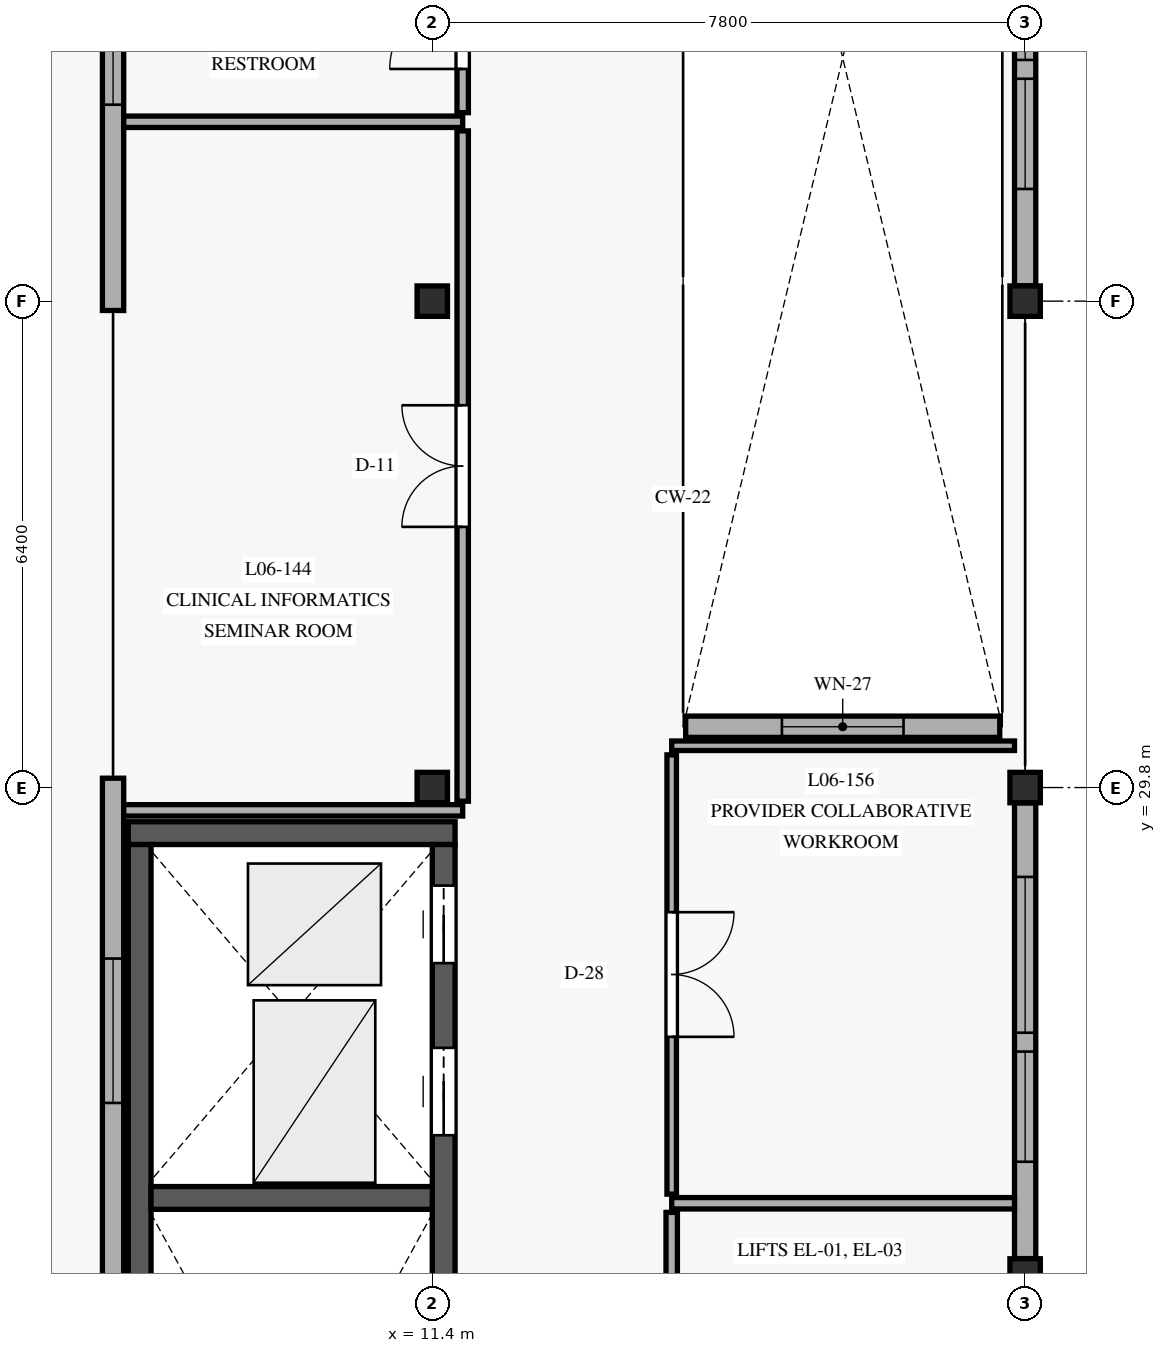
"""IFC4 building model, lengths in metres.
Left out: names, types, materials, properties, quantities, classifications, styles, units other than length and angle.
Written with IfcOpenShell. Run it as: python <this file> out.ifc"""

import sys

from ifc_helpers import new_model, si_unit, direction, frame, frame_2d, origin, origin_with_axes, origin_2d, place, context, subcontext, project, spatial, rectangle, extrude, element, fill, save


model = new_model("IFC4")
c1 = context("Model", 3, precision=1e-05, world=origin(), true_north=direction((0.0, 1.0)))
c2 = subcontext(c1, "Body", "Model", "MODEL_VIEW")
j1 = project(units=[si_unit("LENGTHUNIT", "METRE"), si_unit("PLANEANGLEUNIT", "RADIAN")], contexts=[c1])
p1 = place(None, origin())
s1 = spatial("IfcSite", under=j1, at=p1, CompositionType="ELEMENT")
p2 = place(p1, origin())
s2 = spatial("IfcBuilding", under=s1, at=p2, CompositionType="ELEMENT")
p3 = place(p2, frame((0.0, 0.0, 21.6)))
s3 = spatial("IfcBuildingStorey", under=s2, at=p3, CompositionType="ELEMENT", Elevation=21.6)
for number, where, z_axis, x_axis in (
    (1, (11.4, 29.8, 0.0), (0.0, 0.0, 1.0), (1.0, 0.0, 0.0)),
    (2, (11.4, 36.2, 0.0), (0.0, 0.0, 1.0), (1.0, 0.0, 0.0)),
    (3, (19.2, 23.4, 0.0), (0.0, 0.0, 1.0), (1.0, 0.0, 0.0)),
    (4, (19.2, 29.8, 0.0), (0.0, 0.0, 1.0), (1.0, 0.0, 0.0)),
    (5, (19.2, 36.2, 0.0), (0.0, 0.0, 1.0), (1.0, 0.0, 0.0)),
):
    element("IfcColumn", number, at=place(p3, frame(where, z_axis=z_axis, x_axis=x_axis)), inside=s3, PredefinedType="COLUMN", context=c2, shape_type="SweptSolid", body=[
        extrude(rectangle(XDim=0.4, YDim=0.4, at=origin_2d()), origin(), (0.0, 0.0, 1.0), 4.05),
    ])
p4 = place(p3, frame((11.7, 29.2, 0.0), z_axis=(0.0, 0.0, 1.0), x_axis=(-1.0, 0.0, 0.0)))
e6 = element("IfcWall", 6, at=p4, inside=s3, PredefinedType="SHEAR", context=c2, shape_type="SweptSolid", body=[
    extrude(rectangle(XDim=4.3, YDim=0.3, at=frame_2d((2.15, 0.0))), origin(), (0.0, 0.0, 1.0), 3.84),
])
p5 = place(p3, frame((7.55, 29.05, 0.0), z_axis=(0.0, 0.0, 1.0), x_axis=(0.0, -1.0, 0.0)))
e7 = element("IfcWall", 7, at=p5, inside=s3, PredefinedType="SHEAR", context=c2, shape_type="SweptSolid", body=[
    extrude(rectangle(XDim=11.7, YDim=0.3, at=frame_2d((5.85, 0.0))), origin(), (0.0, 0.0, 1.0), 3.84),
])
p6 = place(p3, frame((11.55, 17.35, 0.0), z_axis=(0.0, 0.0, 1.0), x_axis=(0.0, 1.0, 0.0)))
e8 = element("IfcWall", 8, at=p6, inside=s3, PredefinedType="SHEAR", context=c2, shape_type="SweptSolid", body=[
    extrude(rectangle(XDim=11.7, YDim=0.3, at=frame_2d((5.85, 0.0))), origin(), (0.0, 0.0, 1.0), 3.84),
])
p7 = place(p6, frame((0.2, 0.0, 0.0)))
e9 = element("IfcOpeningElement", 9, at=p7, cuts=e8, PredefinedType="OPENING", context=c2, shape_type="SweptSolid", body=[
    extrude(rectangle(XDim=1.1, YDim=2.2, at=frame_2d((0.55, 1.1))), frame((0.0, 0.16, 0.0), z_axis=(0.0, -1.0, 0.0), x_axis=(1.0, 0.0, 0.0)), (0.0, 0.0, 1.0), 0.32),
])
p8 = place(p6, frame((7.875, 0.0, 0.0)))
e10 = element("IfcOpeningElement", 10, at=p8, cuts=e8, PredefinedType="OPENING", context=c2, shape_type="SweptSolid", body=[
    extrude(rectangle(XDim=1.15, YDim=2.2, at=frame_2d((0.575, 1.1))), frame((0.0, 0.16, 0.0), z_axis=(0.0, -1.0, 0.0), x_axis=(1.0, 0.0, 0.0)), (0.0, 0.0, 1.0), 0.32),
])
p9 = place(p6, frame((10.14, 0.0, 0.0)))
e11 = element("IfcOpeningElement", 11, at=p9, cuts=e8, PredefinedType="OPENING", context=c2, shape_type="SweptSolid", body=[
    extrude(rectangle(XDim=1.02, YDim=2.15, at=frame_2d((0.51, 1.075))), frame((0.0, 0.16, 0.0), z_axis=(0.0, -1.0, 0.0), x_axis=(1.0, 0.0, 0.0)), (0.0, 0.0, 1.0), 0.32),
])
p10 = place(p3, frame((7.7, 24.4, 0.0), z_axis=(0.0, 0.0, 1.0), x_axis=(1.0, 0.0, 0.0)))
e12 = element("IfcWall", 12, at=p10, inside=s3, PredefinedType="SHEAR", context=c2, shape_type="SweptSolid", body=[
    extrude(rectangle(XDim=3.7, YDim=0.3, at=frame_2d((1.85, 0.0))), origin(), (0.0, 0.0, 1.0), 3.84),
])
p11 = place(p3, frame((7.2, 29.923, 0.0), z_axis=(0.0, 0.0, 1.0), x_axis=(0.0, -1.0, 0.0)))
e13 = element("IfcWall", 13, at=p11, inside=s3, PredefinedType="SOLIDWALL", context=c2, shape_type="SweptSolid", body=[
    extrude(rectangle(XDim=6.646, YDim=0.28, at=frame_2d((3.323, 0.0))), origin(), (0.0, 0.0, 1.0), 3.84),
])
p12 = place(p11, frame((2.373, 0.0, 0.85)))
e14 = element("IfcOpeningElement", 14, at=p12, cuts=e13, PredefinedType="OPENING", context=c2, shape_type="SweptSolid", body=[
    extrude(rectangle(XDim=1.9, YDim=1.75, at=frame_2d((0.95, 0.875))), frame((0.0, 0.15, 0.0), z_axis=(0.0, -1.0, 0.0), x_axis=(1.0, 0.0, 0.0)), (0.0, 0.0, 1.0), 0.3),
])
p13 = place(p3, frame((7.2, 42.723, 0.0), z_axis=(0.0, 0.0, 1.0), x_axis=(0.0, -1.0, 0.0)))
e15 = element("IfcWall", 15, at=p13, inside=s3, PredefinedType="SOLIDWALL", context=c2, shape_type="SweptSolid", body=[
    extrude(rectangle(XDim=6.646, YDim=0.28, at=frame_2d((3.323, 0.0))), origin(), (0.0, 0.0, 1.0), 3.84),
])
p14 = place(p13, frame((2.038, 0.0, 0.85)))
e16 = element("IfcOpeningElement", 16, at=p14, cuts=e15, PredefinedType="OPENING", context=c2, shape_type="SweptSolid", body=[
    extrude(rectangle(XDim=1.9, YDim=1.75, at=frame_2d((0.95, 0.875))), frame((0.0, 0.15, 0.0), z_axis=(0.0, -1.0, 0.0), x_axis=(1.0, 0.0, 0.0)), (0.0, 0.0, 1.0), 0.3),
])
p15 = place(p3, frame((19.2, 23.602, 0.0), z_axis=(0.0, 0.0, 1.0), x_axis=(0.0, 1.0, 0.0)))
e17 = element("IfcWall", 17, at=p15, inside=s3, PredefinedType="SOLIDWALL", context=c2, shape_type="SweptSolid", body=[
    extrude(rectangle(XDim=5.996, YDim=0.28, at=frame_2d((2.998, 0.0))), origin(), (0.0, 0.0, 1.0), 3.46),
])
p16 = place(p15, frame((1.274, 0.0, 0.85)))
e18 = element("IfcOpeningElement", 18, at=p16, cuts=e17, PredefinedType="OPENING", context=c2, shape_type="SweptSolid", body=[
    extrude(rectangle(XDim=1.45, YDim=1.95, at=frame_2d((0.725, 0.975))), frame((0.0, 0.15, 0.0), z_axis=(0.0, -1.0, 0.0), x_axis=(1.0, 0.0, 0.0)), (0.0, 0.0, 1.0), 0.3),
])
p17 = place(p15, frame((2.972, 0.0, 0.85)))
e19 = element("IfcOpeningElement", 19, at=p17, cuts=e17, PredefinedType="OPENING", context=c2, shape_type="SweptSolid", body=[
    extrude(rectangle(XDim=2.05, YDim=1.95, at=frame_2d((1.025, 0.975))), frame((0.0, 0.15, 0.0), z_axis=(0.0, -1.0, 0.0), x_axis=(1.0, 0.0, 0.0)), (0.0, 0.0, 1.0), 0.3),
])
p18 = place(p3, frame((19.2, 36.402, 0.0), z_axis=(0.0, 0.0, 1.0), x_axis=(0.0, 1.0, 0.0)))
e20 = element("IfcWall", 20, at=p18, inside=s3, PredefinedType="SOLIDWALL", context=c2, shape_type="SweptSolid", body=[
    extrude(rectangle(XDim=5.996, YDim=0.28, at=frame_2d((2.998, 0.0))), origin(), (0.0, 0.0, 1.0), 3.46),
])
p19 = place(p18, frame((1.274, 0.0, 0.85)))
e21 = element("IfcOpeningElement", 21, at=p19, cuts=e20, PredefinedType="OPENING", context=c2, shape_type="SweptSolid", body=[
    extrude(rectangle(XDim=1.45, YDim=1.95, at=frame_2d((0.725, 0.975))), frame((0.0, 0.15, 0.0), z_axis=(0.0, -1.0, 0.0), x_axis=(1.0, 0.0, 0.0)), (0.0, 0.0, 1.0), 0.3),
])
p20 = place(p18, frame((2.972, 0.0, 0.85)))
e22 = element("IfcOpeningElement", 22, at=p20, cuts=e20, PredefinedType="OPENING", context=c2, shape_type="SweptSolid", body=[
    extrude(rectangle(XDim=2.05, YDim=1.95, at=frame_2d((1.025, 0.975))), frame((0.0, 0.15, 0.0), z_axis=(0.0, -1.0, 0.0), x_axis=(1.0, 0.0, 0.0)), (0.0, 0.0, 1.0), 0.3),
])
p21 = place(p3, frame((18.866, 30.6, 0.0), z_axis=(0.0, 0.0, 1.0), x_axis=(-1.0, 0.0, 0.0)))
e23 = element("IfcWall", 23, at=p21, inside=s3, PredefinedType="SOLIDWALL", context=c2, shape_type="SweptSolid", body=[
    extrude(rectangle(XDim=4.132, YDim=0.28, at=frame_2d((2.066, 0.0))), origin(), (0.0, 0.0, 1.0), 3.84),
])
p22 = place(p21, frame((1.266, 0.0, 0.85)))
e24 = element("IfcOpeningElement", 24, at=p22, cuts=e23, PredefinedType="OPENING", context=c2, shape_type="SweptSolid", body=[
    extrude(rectangle(XDim=1.6, YDim=1.8, at=frame_2d((0.8, 0.9))), frame((0.0, 0.15, 0.0), z_axis=(0.0, -1.0, 0.0), x_axis=(1.0, 0.0, 0.0)), (0.0, 0.0, 1.0), 0.3),
])
p23 = place(p3, frame((11.8, 29.62, 0.0), z_axis=(0.0, 0.0, 1.0), x_axis=(0.0, 1.0, 0.0)))
e25 = element("IfcWall", 25, at=p23, inside=s3, PredefinedType="PARTITIONING", context=c2, shape_type="SweptSolid", body=[
    extrude(rectangle(XDim=8.82, YDim=0.15, at=frame_2d((4.41, 0.0))), origin(), (0.0, 0.0, 1.0), 3.435),
])
p24 = place(p23, frame((3.61, 0.0, 0.0)))
e26 = element("IfcOpeningElement", 26, at=p24, cuts=e25, PredefinedType="OPENING", context=c2, shape_type="SweptSolid", body=[
    extrude(rectangle(XDim=1.6, YDim=2.25, at=frame_2d((0.8, 1.125))), frame((0.0, 0.085, 0.0), z_axis=(0.0, -1.0, 0.0), x_axis=(1.0, 0.0, 0.0)), (0.0, 0.0, 1.0), 0.17),
])
p25 = place(p3, frame((7.34, 38.56, 0.0), z_axis=(0.0, 0.0, 1.0), x_axis=(1.0, 0.0, 0.0)))
e27 = element("IfcWall", 27, at=p25, inside=s3, PredefinedType="PARTITIONING", context=c2, shape_type="SweptSolid", body=[
    extrude(rectangle(XDim=4.46, YDim=0.15, at=frame_2d((2.23, 0.0))), origin(), (0.0, 0.0, 1.0), 3.455),
])
p26 = place(p3, frame((7.34, 29.5, 0.0), z_axis=(0.0, 0.0, 1.0), x_axis=(1.0, 0.0, 0.0)))
e28 = element("IfcWall", 28, at=p26, inside=s3, PredefinedType="PARTITIONING", context=c2, shape_type="SweptSolid", body=[
    extrude(rectangle(XDim=4.46, YDim=0.15, at=frame_2d((2.23, 0.0))), origin(), (0.0, 0.0, 1.0), 3.435),
])
p27 = place(p3, frame((11.8, 38.68, 0.0), z_axis=(0.0, 0.0, 1.0), x_axis=(0.0, 1.0, 0.0)))
e29 = element("IfcWall", 29, at=p27, inside=s3, PredefinedType="PARTITIONING", context=c2, shape_type="SweptSolid", body=[
    extrude(rectangle(XDim=2.11, YDim=0.15, at=frame_2d((1.055, 0.0))), origin(), (0.0, 0.0, 1.0), 3.835),
])
p28 = place(p27, frame((0.575, 0.0, 0.0)))
e30 = element("IfcOpeningElement", 30, at=p28, cuts=e29, PredefinedType="OPENING", context=c2, shape_type="SweptSolid", body=[
    extrude(rectangle(XDim=0.96, YDim=2.1, at=frame_2d((0.48, 1.05))), frame((0.0, 0.085, 0.0), z_axis=(0.0, -1.0, 0.0), x_axis=(1.0, 0.0, 0.0)), (0.0, 0.0, 1.0), 0.17),
])
p29 = place(p3, frame((14.55, 16.89, 0.0), z_axis=(0.0, 0.0, 1.0), x_axis=(0.0, 1.0, 0.0)))
e31 = element("IfcWall", 31, at=p29, inside=s3, PredefinedType="PARTITIONING", context=c2, shape_type="SweptSolid", body=[
    extrude(rectangle(XDim=7.32, YDim=0.15, at=frame_2d((3.66, 0.0))), origin(), (0.0, 0.0, 1.0), 3.435),
])
p30 = place(p29, frame((3.134, 0.0, 0.0)))
e32 = element("IfcOpeningElement", 32, at=p30, cuts=e31, PredefinedType="OPENING", context=c2, shape_type="SweptSolid", body=[
    extrude(rectangle(XDim=0.9, YDim=2.12, at=frame_2d((0.45, 1.06))), frame((0.0, 0.085, 0.0), z_axis=(0.0, -1.0, 0.0), x_axis=(1.0, 0.0, 0.0)), (0.0, 0.0, 1.0), 0.17),
])
p31 = place(p3, frame((14.55, 24.33, 0.0), z_axis=(0.0, 0.0, 1.0), x_axis=(1.0, 0.0, 0.0)))
e33 = element("IfcWall", 33, at=p31, inside=s3, PredefinedType="PARTITIONING", context=c2, shape_type="SweptSolid", body=[
    extrude(rectangle(XDim=4.51, YDim=0.15, at=frame_2d((2.255, 0.0))), origin(), (0.0, 0.0, 1.0), 3.455),
])
p32 = place(p3, frame((14.55, 24.45, 0.0), z_axis=(0.0, 0.0, 1.0), x_axis=(0.0, 1.0, 0.0)))
e34 = element("IfcWall", 34, at=p32, inside=s3, PredefinedType="PARTITIONING", context=c2, shape_type="SweptSolid", body=[
    extrude(rectangle(XDim=5.78, YDim=0.125, at=frame_2d((2.89, 0.0))), origin(), (0.0, 0.0, 1.0), 3.435),
])
p33 = place(p32, frame((2.07, 0.0, 0.0)))
e35 = element("IfcOpeningElement", 35, at=p33, cuts=e34, PredefinedType="OPENING", context=c2, shape_type="SweptSolid", body=[
    extrude(rectangle(XDim=1.64, YDim=2.32, at=frame_2d((0.82, 1.16))), frame((0.0, 0.073, 0.0), z_axis=(0.0, -1.0, 0.0), x_axis=(1.0, 0.0, 0.0)), (0.0, 0.0, 1.0), 0.145),
])
p34 = place(p3, frame((14.55, 30.35, 0.0), z_axis=(0.0, 0.0, 1.0), x_axis=(1.0, 0.0, 0.0)))
e36 = element("IfcWall", 36, at=p34, inside=s3, PredefinedType="PARTITIONING", context=c2, shape_type="SweptSolid", body=[
    extrude(rectangle(XDim=4.51, YDim=0.125, at=frame_2d((2.255, 0.0))), origin(), (0.0, 0.0, 1.0), 3.455),
])
p35 = place(p8, origin_with_axes())
e37 = element("IfcDoor", 37, at=p35, inside=s3, OperationType="SLIDING_TO_LEFT", PredefinedType="DOOR", context=c2, shape_type="SweptSolid", body=[
    extrude(rectangle(XDim=1.15, YDim=2.2, at=frame_2d((0.575, 1.1))), frame((0.0, 0.025, 0.0), z_axis=(0.0, -1.0, 0.0), x_axis=(1.0, 0.0, 0.0)), (0.0, 0.0, 1.0), 0.05),
])
fill(e10, e37)
p36 = place(p9, origin_with_axes())
e38 = element("IfcDoor", 38, at=p36, inside=s3, OperationType="SLIDING_TO_LEFT", PredefinedType="DOOR", context=c2, shape_type="SweptSolid", body=[
    extrude(rectangle(XDim=1.02, YDim=2.15, at=frame_2d((0.51, 1.075))), frame((0.0, 0.025, 0.0), z_axis=(0.0, -1.0, 0.0), x_axis=(1.0, 0.0, 0.0)), (0.0, 0.0, 1.0), 0.05),
])
fill(e11, e38)
p37 = place(p12, origin_with_axes())
e39 = element("IfcWindow", 39, at=p37, inside=s3, PartitioningType="SINGLE_PANEL", PredefinedType="WINDOW", context=c2, shape_type="SweptSolid", body=[
    extrude(rectangle(XDim=1.9, YDim=1.75, at=frame_2d((0.95, 0.875))), frame((0.0, 0.03, 0.0), z_axis=(0.0, -1.0, 0.0), x_axis=(1.0, 0.0, 0.0)), (0.0, 0.0, 1.0), 0.06),
])
fill(e14, e39)
p38 = place(p14, origin_with_axes())
e40 = element("IfcWindow", 40, at=p38, inside=s3, PartitioningType="SINGLE_PANEL", PredefinedType="WINDOW", context=c2, shape_type="SweptSolid", body=[
    extrude(rectangle(XDim=1.9, YDim=1.75, at=frame_2d((0.95, 0.875))), frame((0.0, 0.03, 0.0), z_axis=(0.0, -1.0, 0.0), x_axis=(1.0, 0.0, 0.0)), (0.0, 0.0, 1.0), 0.06),
])
fill(e16, e40)
p39 = place(p16, origin_with_axes())
e41 = element("IfcWindow", 41, at=p39, inside=s3, PartitioningType="SINGLE_PANEL", PredefinedType="WINDOW", context=c2, shape_type="SweptSolid", body=[
    extrude(rectangle(XDim=1.45, YDim=1.95, at=frame_2d((0.725, 0.975))), frame((0.0, 0.03, 0.0), z_axis=(0.0, -1.0, 0.0), x_axis=(1.0, 0.0, 0.0)), (0.0, 0.0, 1.0), 0.06),
])
fill(e18, e41)
p40 = place(p17, origin_with_axes())
e42 = element("IfcWindow", 42, at=p40, inside=s3, PartitioningType="SINGLE_PANEL", PredefinedType="WINDOW", context=c2, shape_type="SweptSolid", body=[
    extrude(rectangle(XDim=2.05, YDim=1.95, at=frame_2d((1.025, 0.975))), frame((0.0, 0.03, 0.0), z_axis=(0.0, -1.0, 0.0), x_axis=(1.0, 0.0, 0.0)), (0.0, 0.0, 1.0), 0.06),
])
fill(e19, e42)
p41 = place(p19, origin_with_axes())
e43 = element("IfcWindow", 43, at=p41, inside=s3, PartitioningType="SINGLE_PANEL", PredefinedType="WINDOW", context=c2, shape_type="SweptSolid", body=[
    extrude(rectangle(XDim=1.45, YDim=1.95, at=frame_2d((0.725, 0.975))), frame((0.0, 0.03, 0.0), z_axis=(0.0, -1.0, 0.0), x_axis=(1.0, 0.0, 0.0)), (0.0, 0.0, 1.0), 0.06),
])
fill(e21, e43)
p42 = place(p20, origin_with_axes())
e44 = element("IfcWindow", 44, at=p42, inside=s3, PartitioningType="SINGLE_PANEL", PredefinedType="WINDOW", context=c2, shape_type="SweptSolid", body=[
    extrude(rectangle(XDim=2.05, YDim=1.95, at=frame_2d((1.025, 0.975))), frame((0.0, 0.03, 0.0), z_axis=(0.0, -1.0, 0.0), x_axis=(1.0, 0.0, 0.0)), (0.0, 0.0, 1.0), 0.06),
])
fill(e22, e44)
p43 = place(p22, origin_with_axes())
e45 = element("IfcWindow", 45, at=p43, inside=s3, PartitioningType="SINGLE_PANEL", PredefinedType="WINDOW", context=c2, shape_type="SweptSolid", body=[
    extrude(rectangle(XDim=1.6, YDim=1.8, at=frame_2d((0.8, 0.9))), frame((0.0, 0.03, 0.0), z_axis=(0.0, -1.0, 0.0), x_axis=(1.0, 0.0, 0.0)), (0.0, 0.0, 1.0), 0.06),
])
fill(e24, e45)
p44 = place(p24, origin_with_axes())
e46 = element("IfcDoor", 46, at=p44, inside=s3, OperationType="DOUBLE_DOOR_SINGLE_SWING", PredefinedType="DOOR", context=c2, shape_type="SweptSolid", body=[
    extrude(rectangle(XDim=1.6, YDim=2.25, at=frame_2d((0.8, 1.125))), frame((0.0, 0.025, 0.0), z_axis=(0.0, -1.0, 0.0), x_axis=(1.0, 0.0, 0.0)), (0.0, 0.0, 1.0), 0.05),
])
fill(e26, e46)
p45 = place(p28, origin_with_axes())
e47 = element("IfcDoor", 47, at=p45, inside=s3, OperationType="SINGLE_SWING_LEFT", PredefinedType="DOOR", context=c2, shape_type="SweptSolid", body=[
    extrude(rectangle(XDim=0.96, YDim=2.1, at=frame_2d((0.48, 1.05))), frame((0.0, 0.025, 0.0), z_axis=(0.0, -1.0, 0.0), x_axis=(1.0, 0.0, 0.0)), (0.0, 0.0, 1.0), 0.05),
])
fill(e30, e47)
p46 = place(p33, frame((1.64, 0.0, 0.0), z_axis=(0.0, 0.0, 1.0), x_axis=(-1.0, 0.0, 0.0)))
e48 = element("IfcDoor", 48, at=p46, inside=s3, OperationType="DOUBLE_DOOR_SINGLE_SWING", PredefinedType="DOOR", context=c2, shape_type="SweptSolid", body=[
    extrude(rectangle(XDim=1.64, YDim=2.32, at=frame_2d((0.82, 1.16))), frame((0.0, 0.025, 0.0), z_axis=(0.0, -1.0, 0.0), x_axis=(1.0, 0.0, 0.0)), (0.0, 0.0, 1.0), 0.05),
])
fill(e35, e48)
save(model, sys.argv[1])
